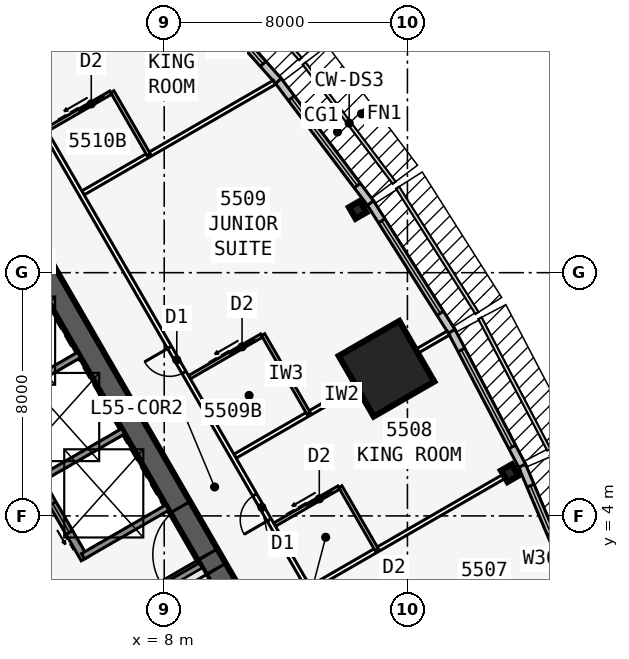
"""IFC4 building model, lengths in metres.
Left out: names, types, materials, properties, quantities, classifications, styles, units other than length and angle.
Written with IfcOpenShell. Run it as: python <this file> out.ifc"""

import sys

from ifc_helpers import new_model, si_unit, direction, frame, frame_2d, origin, origin_2d, place, context, subcontext, project, spatial, rectangle, i_section, extrude, element, fill, save


model = new_model("IFC4")
c1 = context("Model", 3, precision=1e-05, world=origin(), true_north=direction((0.0, 1.0)))
c2 = subcontext(c1, "Body", "Model", "MODEL_VIEW")
j1 = project(units=[si_unit("LENGTHUNIT", "METRE"), si_unit("PLANEANGLEUNIT", "RADIAN")], contexts=[c1])
p1 = place(None, origin())
s1 = spatial("IfcSite", under=j1, at=p1, CompositionType="ELEMENT")
p2 = place(p1, origin())
s2 = spatial("IfcBuilding", under=s1, at=p2, CompositionType="ELEMENT")
p3 = place(p2, frame((0.0, 0.0, 208.1)))
s3 = spatial("IfcBuildingStorey", under=s2, at=p3, CompositionType="ELEMENT", Elevation=208.1)
p4 = place(p3, frame((16.5, -9.526, 0.0), z_axis=(0.0, 0.0, 1.0), x_axis=(-0.499999749417, 0.866025548458, 0.0)))
e1 = element("IfcWall", 1, at=p4, inside=s3, PredefinedType="SHEAR", context=c2, shape_type="SweptSolid", body=[
    extrude(rectangle(XDim=33.0, YDim=0.75, at=frame_2d((16.5, 0.0))), origin(), (0.0, 0.0, 1.0), 3.6),
])
p5 = place(p4, frame((14.15, 0.0, 0.0)))
e2 = element("IfcOpeningElement", 2, at=p5, cuts=e1, PredefinedType="OPENING", context=c2, shape_type="SweptSolid", body=[
    extrude(rectangle(XDim=1.8, YDim=2.13, at=frame_2d((0.9, 1.065))), frame((0.0, 0.385, 0.0), z_axis=(0.0, -1.0, 0.0), x_axis=(1.0, 0.0, 0.0)), (0.0, 0.0, 1.0), 0.77),
])
p6 = place(p4, frame((12.6, 0.0, 0.0)))
e3 = element("IfcOpeningElement", 3, at=p6, cuts=e1, PredefinedType="OPENING", context=c2, shape_type="SweptSolid", body=[
    extrude(rectangle(XDim=1.0, YDim=2.13, at=frame_2d((0.5, 1.065))), frame((0.0, 0.385, 0.0), z_axis=(0.0, -1.0, 0.0), x_axis=(1.0, 0.0, 0.0)), (0.0, 0.0, 1.0), 0.77),
])
p7 = place(p3, frame((5.379, 2.586, 0.0), z_axis=(0.0, 0.0, 1.0), x_axis=(-0.500001375892, 0.866024609411, 0.0)))
e4 = element("IfcWall", 4, at=p7, inside=s3, PredefinedType="SOLIDWALL", context=c2, shape_type="SweptSolid", body=[
    extrude(rectangle(XDim=10.633, YDim=0.25, at=frame_2d((5.316, 0.0))), origin(), (0.0, 0.0, 1.0), 3.435),
])
p8 = place(p7, frame((9.164, 0.0, 0.0)))
e5 = element("IfcOpeningElement", 5, at=p8, cuts=e4, PredefinedType="OPENING", context=c2, shape_type="SweptSolid", body=[
    extrude(rectangle(XDim=0.9, YDim=2.13, at=frame_2d((0.45, 1.065))), frame((0.0, 0.135, 0.0), z_axis=(0.0, -1.0, 0.0), x_axis=(1.0, 0.0, 0.0)), (0.0, 0.0, 1.0), 0.27),
])
p9 = place(p7, frame((1.0, 0.0, 0.0)))
e6 = element("IfcOpeningElement", 6, at=p9, cuts=e4, PredefinedType="OPENING", context=c2, shape_type="SweptSolid", body=[
    extrude(rectangle(XDim=1.1, YDim=2.13, at=frame_2d((0.55, 1.065))), frame((0.0, 0.135, 0.0), z_axis=(0.0, -1.0, 0.0), x_axis=(1.0, 0.0, 0.0)), (0.0, 0.0, 1.0), 0.27),
])
p10 = place(p7, frame((3.9, 0.0, 0.0)))
e7 = element("IfcOpeningElement", 7, at=p10, cuts=e4, PredefinedType="OPENING", context=c2, shape_type="SweptSolid", body=[
    extrude(rectangle(XDim=1.1, YDim=2.13, at=frame_2d((0.55, 1.065))), frame((0.0, 0.135, 0.0), z_axis=(0.0, -1.0, 0.0), x_axis=(1.0, 0.0, 0.0)), (0.0, 0.0, 1.0), 0.27),
])
p11 = place(p7, frame((6.8, 0.0, 0.0)))
e8 = element("IfcOpeningElement", 8, at=p11, cuts=e4, PredefinedType="OPENING", context=c2, shape_type="SweptSolid", body=[
    extrude(rectangle(XDim=1.1, YDim=2.13, at=frame_2d((0.55, 1.065))), frame((0.0, 0.135, 0.0), z_axis=(0.0, -1.0, 0.0), x_axis=(1.0, 0.0, 0.0)), (0.0, 0.0, 1.0), 0.27),
])
p12 = place(p3, frame((6.429, 0.767, 0.0), z_axis=(0.0, 0.0, 1.0), x_axis=(0.866042017984, 0.499971222258, 0.0)))
e9 = element("IfcWall", 9, at=p12, inside=s3, PredefinedType="SOLIDWALL", context=c2, shape_type="SweptSolid", body=[
    extrude(rectangle(XDim=3.2, YDim=0.2, at=frame_2d((1.6, 0.0))), origin(), (0.0, 0.0, 1.0), 3.435),
])
p13 = place(p3, frame((5.329, 2.673, 0.0), z_axis=(0.0, 0.0, 1.0), x_axis=(0.866022944154, 0.50000426018, 0.0)))
e10 = element("IfcWall", 10, at=p13, inside=s3, PredefinedType="SOLIDWALL", context=c2, shape_type="SweptSolid", body=[
    extrude(rectangle(XDim=3.2, YDim=0.2, at=frame_2d((1.6, 0.0))), origin(), (0.0, 0.0, 1.0), 3.435),
])
for number, where, z_axis, x_axis in (
    (11, (3.879, 5.184, 0.0), (0.0, 0.0, 1.0), (0.866, 0.5, 0.0)),
    (12, (2.429, 7.696, 0.0), (0.0, 0.0, 1.0), (0.866, 0.5, 0.0)),
):
    element("IfcWall", number, at=place(p3, frame(where, z_axis=z_axis, x_axis=x_axis)), inside=s3, PredefinedType="SOLIDWALL", context=c2, shape_type="SweptSolid", body=[
        extrude(rectangle(XDim=3.2, YDim=0.2, at=frame_2d((1.6, 0.0))), origin(), (0.0, 0.0, 1.0), 3.435),
    ])
for number, where, z_axis, x_axis in (
    (13, (19.363, 5.406, 0.0), (0.0, 0.0, 1.0), (0.866, 0.5, 0.0)),
    (14, (14.363, 14.066, 0.0), (0.0, 0.0, 1.0), (0.866, 0.5, 0.0)),
):
    element("IfcColumn", number, at=place(p3, frame(where, z_axis=z_axis, x_axis=x_axis)), inside=s3, PredefinedType="COLUMN", context=c2, shape_type="SweptSolid", body=[
        extrude(i_section(OverallWidth=0.411, OverallDepth=0.434, WebThickness=0.036, FlangeThickness=0.057, at=origin_2d()), origin(), (0.0, 0.0, 1.0), 3.6),
    ])
p14 = place(p3, frame((15.312, 8.84, 0.0), z_axis=(0.0, 0.0, 1.0), x_axis=(0.866025403784, 0.5, 0.0)))
e15 = element("IfcColumn", 15, at=p14, inside=s3, PredefinedType="COLUMN", context=c2, shape_type="SweptSolid", body=[
    extrude(rectangle(XDim=2.3, YDim=2.3, at=origin_2d()), origin(), (0.0, 0.0, 1.0), 3.6),
])
p15 = place(p3, frame((21.733, 1.018, 0.0), z_axis=(0.0, 0.0, 1.0), x_axis=(-0.390096809471, 0.920773848044, 0.0)))
e16 = element("IfcWall", 16, at=p15, inside=s3, PredefinedType="STANDARD", context=c2, shape_type="SweptSolid", body=[
    extrude(rectangle(XDim=5.038, YDim=0.25, at=frame_2d((2.519, 0.0))), origin(), (0.0, 0.0, 1.0), 3.435),
])
p16 = place(p15, frame((0.719, 0.0, 0.45)))
e17 = element("IfcOpeningElement", 17, at=p16, cuts=e16, PredefinedType="OPENING", context=c2, shape_type="SweptSolid", body=[
    extrude(rectangle(XDim=3.6, YDim=2.6, at=frame_2d((1.8, 1.3))), frame((0.0, 0.135, 0.0), z_axis=(0.0, -1.0, 0.0), x_axis=(1.0, 0.0, 0.0)), (0.0, 0.0, 1.0), 0.27),
])
p17 = place(p3, frame((19.772, 5.648, 0.0), z_axis=(0.0, 0.0, 1.0), x_axis=(-0.463976002579, 0.885847768542, 0.0)))
e18 = element("IfcWall", 18, at=p17, inside=s3, PredefinedType="STANDARD", context=c2, shape_type="SweptSolid", body=[
    extrude(rectangle(XDim=5.004, YDim=0.25, at=frame_2d((2.502, 0.0))), origin(), (0.0, 0.0, 1.0), 3.435),
])
p18 = place(p17, frame((0.702, 0.0, 0.45)))
e19 = element("IfcOpeningElement", 19, at=p18, cuts=e18, PredefinedType="OPENING", context=c2, shape_type="SweptSolid", body=[
    extrude(rectangle(XDim=3.6, YDim=2.6, at=frame_2d((1.8, 1.3))), frame((0.0, 0.135, 0.0), z_axis=(0.0, -1.0, 0.0), x_axis=(1.0, 0.0, 0.0)), (0.0, 0.0, 1.0), 0.27),
])
p19 = place(p3, frame((17.456, 10.072, 0.0), z_axis=(0.0, 0.0, 1.0), x_axis=(-0.535220361449, 0.844712474568, 0.0)))
e20 = element("IfcWall", 20, at=p19, inside=s3, PredefinedType="STANDARD", context=c2, shape_type="SweptSolid", body=[
    extrude(rectangle(XDim=5.004, YDim=0.25, at=frame_2d((2.502, 0.0))), origin(), (0.0, 0.0, 1.0), 3.435),
])
p20 = place(p19, frame((0.702, 0.0, 0.45)))
e21 = element("IfcOpeningElement", 21, at=p20, cuts=e20, PredefinedType="OPENING", context=c2, shape_type="SweptSolid", body=[
    extrude(rectangle(XDim=3.6, YDim=2.6, at=frame_2d((1.8, 1.3))), frame((0.0, 0.135, 0.0), z_axis=(0.0, -1.0, 0.0), x_axis=(1.0, 0.0, 0.0)), (0.0, 0.0, 1.0), 0.27),
])
p21 = place(p3, frame((14.783, 14.291, 0.0), z_axis=(0.0, 0.0, 1.0), x_axis=(-0.602408653511, 0.798187831388, 0.0)))
e22 = element("IfcWall", 22, at=p21, inside=s3, PredefinedType="STANDARD", context=c2, shape_type="SweptSolid", body=[
    extrude(rectangle(XDim=5.038, YDim=0.25, at=frame_2d((2.519, 0.0))), origin(), (0.0, 0.0, 1.0), 3.435),
])
p22 = place(p21, frame((0.719, 0.0, 0.45)))
e23 = element("IfcOpeningElement", 23, at=p22, cuts=e22, PredefinedType="OPENING", context=c2, shape_type="SweptSolid", body=[
    extrude(rectangle(XDim=3.6, YDim=2.6, at=frame_2d((1.8, 1.3))), frame((0.0, 0.135, 0.0), z_axis=(0.0, -1.0, 0.0), x_axis=(1.0, 0.0, 0.0)), (0.0, 0.0, 1.0), 0.27),
])
p23 = place(p3, frame((11.754, 18.304, 0.0), z_axis=(0.0, 0.0, 1.0), x_axis=(-0.664348996191, 0.747422511876, 0.0)))
e24 = element("IfcWall", 24, at=p23, inside=s3, PredefinedType="STANDARD", context=c2, shape_type="SweptSolid", body=[
    extrude(rectangle(XDim=5.105, YDim=0.25, at=frame_2d((2.552, 0.0))), origin(), (0.0, 0.0, 1.0), 3.435),
])
p24 = place(p23, frame((0.752, 0.0, 0.45)))
e25 = element("IfcOpeningElement", 25, at=p24, cuts=e24, PredefinedType="OPENING", context=c2, shape_type="SweptSolid", body=[
    extrude(rectangle(XDim=3.6, YDim=2.6, at=frame_2d((1.8, 1.3))), frame((0.0, 0.135, 0.0), z_axis=(0.0, -1.0, 0.0), x_axis=(1.0, 0.0, 0.0)), (0.0, 0.0, 1.0), 0.27),
])
p25 = place(p3, frame((20.102, -11.115, 0.0), z_axis=(0.0, 0.0, 1.0), x_axis=(-0.500000265775, 0.866025250339, 0.0)))
e26 = element("IfcWall", 26, at=p25, inside=s3, PredefinedType="PARTITIONING", context=c2, shape_type="SweptSolid", body=[
    extrude(rectangle(XDim=39.354, YDim=0.15, at=frame_2d((19.677, 0.0))), origin(), (0.0, 0.0, 1.0), 3.435),
])
p26 = place(p25, frame((1.665, 0.0, 0.0)))
e27 = element("IfcOpeningElement", 27, at=p26, cuts=e26, PredefinedType="OPENING", context=c2, shape_type="SweptSolid", body=[
    extrude(rectangle(XDim=0.95, YDim=2.13, at=frame_2d((0.475, 1.065))), frame((0.0, 0.085, 0.0), z_axis=(0.0, -1.0, 0.0), x_axis=(1.0, 0.0, 0.0)), (0.0, 0.0, 1.0), 0.17),
])
p27 = place(p25, frame((12.902, 0.0, 0.0)))
e28 = element("IfcOpeningElement", 28, at=p27, cuts=e26, PredefinedType="OPENING", context=c2, shape_type="SweptSolid", body=[
    extrude(rectangle(XDim=0.95, YDim=2.13, at=frame_2d((0.475, 1.065))), frame((0.0, 0.085, 0.0), z_axis=(0.0, -1.0, 0.0), x_axis=(1.0, 0.0, 0.0)), (0.0, 0.0, 1.0), 0.17),
])
p28 = place(p25, frame((17.302, 0.0, 0.0)))
e29 = element("IfcOpeningElement", 29, at=p28, cuts=e26, PredefinedType="OPENING", context=c2, shape_type="SweptSolid", body=[
    extrude(rectangle(XDim=0.95, YDim=2.13, at=frame_2d((0.475, 1.065))), frame((0.0, 0.085, 0.0), z_axis=(0.0, -1.0, 0.0), x_axis=(1.0, 0.0, 0.0)), (0.0, 0.0, 1.0), 0.17),
])
p29 = place(p25, frame((22.902, 0.0, 0.0)))
e30 = element("IfcOpeningElement", 30, at=p29, cuts=e26, PredefinedType="OPENING", context=c2, shape_type="SweptSolid", body=[
    extrude(rectangle(XDim=0.95, YDim=2.13, at=frame_2d((0.475, 1.065))), frame((0.0, 0.085, 0.0), z_axis=(0.0, -1.0, 0.0), x_axis=(1.0, 0.0, 0.0)), (0.0, 0.0, 1.0), 0.17),
])
p30 = place(p25, frame((32.302, 0.0, 0.0)))
e31 = element("IfcOpeningElement", 31, at=p30, cuts=e26, PredefinedType="OPENING", context=c2, shape_type="SweptSolid", body=[
    extrude(rectangle(XDim=0.95, YDim=2.13, at=frame_2d((0.475, 1.065))), frame((0.0, 0.085, 0.0), z_axis=(0.0, -1.0, 0.0), x_axis=(1.0, 0.0, 0.0)), (0.0, 0.0, 1.0), 0.17),
])
p31 = place(p25, frame((37.302, 0.0, 0.0)))
e32 = element("IfcOpeningElement", 32, at=p31, cuts=e26, PredefinedType="OPENING", context=c2, shape_type="SweptSolid", body=[
    extrude(rectangle(XDim=0.95, YDim=2.13, at=frame_2d((0.475, 1.065))), frame((0.0, 0.085, 0.0), z_axis=(0.0, -1.0, 0.0), x_axis=(1.0, 0.0, 0.0)), (0.0, 0.0, 1.0), 0.17),
])
p32 = place(p3, frame((12.829, 1.633, 0.0), z_axis=(0.0, 0.0, 1.0), x_axis=(0.866030558329, 0.49999107196, 0.0)))
e33 = element("IfcWall", 33, at=p32, inside=s3, PredefinedType="PARTITIONING", context=c2, shape_type="SweptSolid", body=[
    extrude(rectangle(XDim=7.894, YDim=0.15, at=frame_2d((3.947, 0.0))), origin(), (0.0, 0.0, 1.0), 2.589),
])
p33 = place(p3, frame((10.329, 5.963, 0.0), z_axis=(0.0, 0.0, 1.0), x_axis=(0.866016460812, 0.500015489362, 0.0)))
e34 = element("IfcWall", 34, at=p33, inside=s3, PredefinedType="PARTITIONING", context=c2, shape_type="SweptSolid", body=[
    extrude(rectangle(XDim=8.101, YDim=0.15, at=frame_2d((4.051, 0.0))), origin(), (0.0, 0.0, 1.0), 2.589),
])
p34 = place(p3, frame((5.329, 14.623, 0.0), z_axis=(0.0, 0.0, 1.0), x_axis=(0.866017877653, 0.500013035415, 0.0)))
e35 = element("IfcWall", 35, at=p34, inside=s3, PredefinedType="PARTITIONING", context=c2, shape_type="SweptSolid", body=[
    extrude(rectangle(XDim=7.273, YDim=0.15, at=frame_2d((3.636, 0.0))), origin(), (0.0, 0.0, 1.0), 2.589),
])
p35 = place(p3, frame((2.829, 18.954, 0.0), z_axis=(0.0, 0.0, 1.0), x_axis=(0.866026604282, 0.499997920671, 0.0)))
e36 = element("IfcWall", 36, at=p35, inside=s3, PredefinedType="PARTITIONING", context=c2, shape_type="SweptSolid", body=[
    extrude(rectangle(XDim=6.24, YDim=0.15, at=frame_2d((3.12, 0.0))), origin(), (0.0, 0.0, 1.0), 2.589),
])
p36 = place(p3, frame((14.993, 2.883, 0.0), z_axis=(0.0, 0.0, 1.0), x_axis=(-0.500001309137, 0.866024647952, 0.0)))
e37 = element("IfcWall", 37, at=p36, inside=s3, PredefinedType="PLUMBINGWALL", context=c2, shape_type="SweptSolid", body=[
    extrude(rectangle(XDim=2.4, YDim=0.12, at=frame_2d((1.2, 0.0))), origin(), (0.0, 0.0, 1.0), 3.435),
])
p37 = place(p3, frame((11.628, 3.711, 0.0), z_axis=(0.0, 0.0, 1.0), x_axis=(0.866048967903, 0.499959183527, 0.0)))
e38 = element("IfcWall", 38, at=p37, inside=s3, PredefinedType="PLUMBINGWALL", context=c2, shape_type="SweptSolid", body=[
    extrude(rectangle(XDim=2.44, YDim=0.12, at=frame_2d((1.22, 0.0))), origin(), (0.0, 0.0, 1.0), 3.435),
])
p38 = place(p37, frame((1.25, 0.0, 0.0)))
e39 = element("IfcOpeningElement", 39, at=p38, cuts=e38, PredefinedType="OPENING", context=c2, shape_type="SweptSolid", body=[
    extrude(rectangle(XDim=0.9, YDim=2.13, at=frame_2d((0.45, 1.065))), frame((0.0, 0.07, 0.0), z_axis=(0.0, -1.0, 0.0), x_axis=(1.0, 0.0, 0.0)), (0.0, 0.0, 1.0), 0.14),
])
p39 = place(p3, frame((12.753, 7.363, 0.0), z_axis=(0.0, 0.0, 1.0), x_axis=(-0.499990139034, 0.866031096941, 0.0)))
e40 = element("IfcWall", 40, at=p39, inside=s3, PredefinedType="PLUMBINGWALL", context=c2, shape_type="SweptSolid", body=[
    extrude(rectangle(XDim=3.0, YDim=0.12, at=frame_2d((1.5, 0.0))), origin(), (0.0, 0.0, 1.0), 3.435),
])
p40 = place(p3, frame((8.829, 8.561, 0.0), z_axis=(0.0, 0.0, 1.0), x_axis=(0.866035715982, 0.499982138324, 0.0)))
e41 = element("IfcWall", 41, at=p40, inside=s3, PredefinedType="PLUMBINGWALL", context=c2, shape_type="SweptSolid", body=[
    extrude(rectangle(XDim=2.74, YDim=0.12, at=frame_2d((1.37, 0.0))), origin(), (0.0, 0.0, 1.0), 3.435),
])
p41 = place(p40, frame((1.55, 0.0, 0.0)))
e42 = element("IfcOpeningElement", 42, at=p41, cuts=e41, PredefinedType="OPENING", context=c2, shape_type="SweptSolid", body=[
    extrude(rectangle(XDim=0.9, YDim=2.13, at=frame_2d((0.45, 1.065))), frame((0.0, 0.07, 0.0), z_axis=(0.0, -1.0, 0.0), x_axis=(1.0, 0.0, 0.0)), (0.0, 0.0, 1.0), 0.14),
])
p42 = place(p3, frame((7.493, 15.873, 0.0), z_axis=(0.0, 0.0, 1.0), x_axis=(-0.499957262057, 0.866050077142, 0.0)))
e43 = element("IfcWall", 43, at=p42, inside=s3, PredefinedType="PLUMBINGWALL", context=c2, shape_type="SweptSolid", body=[
    extrude(rectangle(XDim=2.4, YDim=0.12, at=frame_2d((1.2, 0.0))), origin(), (0.0, 0.0, 1.0), 3.435),
])
p43 = place(p3, frame((4.128, 16.702, 0.0), z_axis=(0.0, 0.0, 1.0), x_axis=(0.866048967903, 0.499959183527, 0.0)))
e44 = element("IfcWall", 44, at=p43, inside=s3, PredefinedType="PLUMBINGWALL", context=c2, shape_type="SweptSolid", body=[
    extrude(rectangle(XDim=2.44, YDim=0.12, at=frame_2d((1.22, 0.0))), origin(), (0.0, 0.0, 1.0), 3.435),
])
p44 = place(p43, frame((1.25, 0.0, 0.0)))
e45 = element("IfcOpeningElement", 45, at=p44, cuts=e44, PredefinedType="OPENING", context=c2, shape_type="SweptSolid", body=[
    extrude(rectangle(XDim=0.9, YDim=2.13, at=frame_2d((0.45, 1.065))), frame((0.0, 0.07, 0.0), z_axis=(0.0, -1.0, 0.0), x_axis=(1.0, 0.0, 0.0)), (0.0, 0.0, 1.0), 0.14),
])
p45 = place(p16, origin())
e46 = element("IfcWindow", 46, at=p45, inside=s3, PartitioningType="SINGLE_PANEL", PredefinedType="WINDOW", context=c2, shape_type="SweptSolid", body=[
    extrude(rectangle(XDim=3.6, YDim=2.6, at=frame_2d((1.8, 1.3))), frame((0.0, 0.03, 0.0), z_axis=(0.0, -1.0, 0.0), x_axis=(1.0, 0.0, 0.0)), (0.0, 0.0, 1.0), 0.06),
])
fill(e17, e46)
p46 = place(p18, origin())
e47 = element("IfcWindow", 47, at=p46, inside=s3, PartitioningType="SINGLE_PANEL", PredefinedType="WINDOW", context=c2, shape_type="SweptSolid", body=[
    extrude(rectangle(XDim=3.6, YDim=2.6, at=frame_2d((1.8, 1.3))), frame((0.0, 0.03, 0.0), z_axis=(0.0, -1.0, 0.0), x_axis=(1.0, 0.0, 0.0)), (0.0, 0.0, 1.0), 0.06),
])
fill(e19, e47)
p47 = place(p20, origin())
e48 = element("IfcWindow", 48, at=p47, inside=s3, PartitioningType="SINGLE_PANEL", PredefinedType="WINDOW", context=c2, shape_type="SweptSolid", body=[
    extrude(rectangle(XDim=3.6, YDim=2.6, at=frame_2d((1.8, 1.3))), frame((0.0, 0.03, 0.0), z_axis=(0.0, -1.0, 0.0), x_axis=(1.0, 0.0, 0.0)), (0.0, 0.0, 1.0), 0.06),
])
fill(e21, e48)
p48 = place(p22, origin())
e49 = element("IfcWindow", 49, at=p48, inside=s3, PartitioningType="SINGLE_PANEL", PredefinedType="WINDOW", context=c2, shape_type="SweptSolid", body=[
    extrude(rectangle(XDim=3.6, YDim=2.6, at=frame_2d((1.8, 1.3))), frame((0.0, 0.03, 0.0), z_axis=(0.0, -1.0, 0.0), x_axis=(1.0, 0.0, 0.0)), (0.0, 0.0, 1.0), 0.06),
])
fill(e23, e49)
p49 = place(p24, origin())
e50 = element("IfcWindow", 50, at=p49, inside=s3, PartitioningType="SINGLE_PANEL", PredefinedType="WINDOW", context=c2, shape_type="SweptSolid", body=[
    extrude(rectangle(XDim=3.6, YDim=2.6, at=frame_2d((1.8, 1.3))), frame((0.0, 0.03, 0.0), z_axis=(0.0, -1.0, 0.0), x_axis=(1.0, 0.0, 0.0)), (0.0, 0.0, 1.0), 0.06),
])
fill(e25, e50)
p50 = place(p38, origin())
e51 = element("IfcDoor", 51, at=p50, inside=s3, OperationType="SLIDING_TO_LEFT", PredefinedType="DOOR", context=c2, shape_type="SweptSolid", body=[
    extrude(rectangle(XDim=0.9, YDim=2.13, at=frame_2d((0.45, 1.065))), frame((0.0, 0.025, 0.0), z_axis=(0.0, -1.0, 0.0), x_axis=(1.0, 0.0, 0.0)), (0.0, 0.0, 1.0), 0.05),
])
fill(e39, e51)
p51 = place(p28, origin())
e52 = element("IfcDoor", 52, at=p51, inside=s3, OperationType="SINGLE_SWING_LEFT", PredefinedType="DOOR", context=c2, shape_type="SweptSolid", body=[
    extrude(rectangle(XDim=0.95, YDim=2.13, at=frame_2d((0.475, 1.065))), frame((0.0, 0.025, 0.0), z_axis=(0.0, -1.0, 0.0), x_axis=(1.0, 0.0, 0.0)), (0.0, 0.0, 1.0), 0.05),
])
fill(e29, e52)
p52 = place(p41, origin())
e53 = element("IfcDoor", 53, at=p52, inside=s3, OperationType="SLIDING_TO_LEFT", PredefinedType="DOOR", context=c2, shape_type="SweptSolid", body=[
    extrude(rectangle(XDim=0.9, YDim=2.13, at=frame_2d((0.45, 1.065))), frame((0.0, 0.025, 0.0), z_axis=(0.0, -1.0, 0.0), x_axis=(1.0, 0.0, 0.0)), (0.0, 0.0, 1.0), 0.05),
])
fill(e42, e53)
p53 = place(p29, origin())
e54 = element("IfcDoor", 54, at=p53, inside=s3, OperationType="SINGLE_SWING_RIGHT", PredefinedType="DOOR", context=c2, shape_type="SweptSolid", body=[
    extrude(rectangle(XDim=0.95, YDim=2.13, at=frame_2d((0.475, 1.065))), frame((0.0, 0.025, 0.0), z_axis=(0.0, -1.0, 0.0), x_axis=(1.0, 0.0, 0.0)), (0.0, 0.0, 1.0), 0.05),
])
fill(e30, e54)
p54 = place(p44, origin())
e55 = element("IfcDoor", 55, at=p54, inside=s3, OperationType="SLIDING_TO_LEFT", PredefinedType="DOOR", context=c2, shape_type="SweptSolid", body=[
    extrude(rectangle(XDim=0.9, YDim=2.13, at=frame_2d((0.45, 1.065))), frame((0.0, 0.025, 0.0), z_axis=(0.0, -1.0, 0.0), x_axis=(1.0, 0.0, 0.0)), (0.0, 0.0, 1.0), 0.05),
])
fill(e45, e55)
p55 = place(p5, origin())
e56 = element("IfcDoor", 56, at=p55, inside=s3, OperationType="DOUBLE_DOOR_SINGLE_SWING", PredefinedType="DOOR", context=c2, shape_type="SweptSolid", body=[
    extrude(rectangle(XDim=1.8, YDim=2.13, at=frame_2d((0.9, 1.065))), frame((0.0, 0.025, 0.0), z_axis=(0.0, -1.0, 0.0), x_axis=(1.0, 0.0, 0.0)), (0.0, 0.0, 1.0), 0.05),
])
fill(e2, e56)
p56 = place(p6, origin())
e57 = element("IfcDoor", 57, at=p56, inside=s3, OperationType="SINGLE_SWING_RIGHT", PredefinedType="DOOR", context=c2, shape_type="SweptSolid", body=[
    extrude(rectangle(XDim=1.0, YDim=2.13, at=frame_2d((0.5, 1.065))), frame((0.0, 0.025, 0.0), z_axis=(0.0, -1.0, 0.0), x_axis=(1.0, 0.0, 0.0)), (0.0, 0.0, 1.0), 0.05),
])
fill(e3, e57)
p57 = place(p9, origin())
e58 = element("IfcDoor", 58, at=p57, inside=s3, OperationType="DOUBLE_DOOR_SLIDING", PredefinedType="USERDEFINED", context=c2, shape_type="SweptSolid", body=[
    extrude(rectangle(XDim=1.1, YDim=2.13, at=frame_2d((0.55, 1.065))), frame((0.0, 0.025, 0.0), z_axis=(0.0, -1.0, 0.0), x_axis=(1.0, 0.0, 0.0)), (0.0, 0.0, 1.0), 0.05),
])
fill(e6, e58)
save(model, sys.argv[1])
